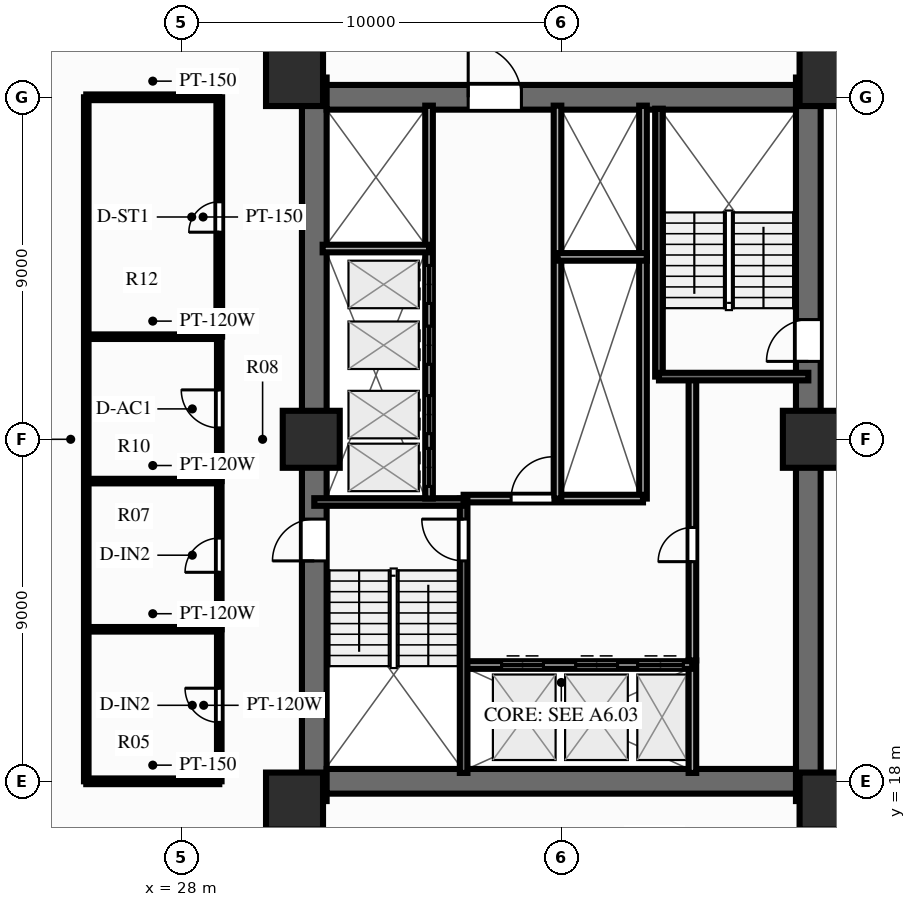
"""IFC4 building model, lengths in metres.
Left out: names, types, materials, properties, quantities, classifications, styles, units other than length and angle.
Written with IfcOpenShell. Run it as: python <this file> out.ifc"""

import sys

from ifc_helpers import new_model, si_unit, direction, frame, frame_2d, origin, origin_2d, place, context, subcontext, project, spatial, rectangle, extrude, source, transform, mapped, element, fill, save


model = new_model("IFC4")
c1 = context("Model", 3, precision=1e-05, world=origin(), true_north=direction((0.0, 1.0)))
c2 = subcontext(c1, "Body", "Model", "MODEL_VIEW")
j1 = project(units=[si_unit("LENGTHUNIT", "METRE"), si_unit("PLANEANGLEUNIT", "RADIAN")], contexts=[c1])
p1 = place(None, origin())
s1 = spatial("IfcSite", under=j1, at=p1, CompositionType="ELEMENT")
p2 = place(p1, origin())
s2 = spatial("IfcBuilding", under=s1, at=p2, CompositionType="ELEMENT")
p3 = place(p2, frame((0.0, 0.0, 11.4)))
s3 = spatial("IfcBuildingStorey", under=s2, at=p3, CompositionType="ELEMENT", Elevation=11.4)
p4 = place(p3, frame((31.5, 17.48, 0.0), z_axis=(0.0, 0.0, 1.0), x_axis=(0.0, 1.0, 0.0)))
e1 = element("IfcWall", 1, at=p4, inside=s3, PredefinedType="SHEAR", context=c2, shape_type="SweptSolid", body=[
    extrude(rectangle(XDim=19.04, YDim=0.65, at=frame_2d((9.52, 0.0))), origin(), (0.0, 0.0, 1.0), 3.6),
])
p5 = place(p4, frame((6.32, 0.0, 0.0)))
e2 = element("IfcOpeningElement", 2, at=p5, cuts=e1, PredefinedType="OPENING", context=c2, shape_type="SweptSolid", body=[
    extrude(rectangle(XDim=1.1, YDim=2.15, at=frame_2d((0.55, 1.075))), frame((0.0, 0.337, 0.0), z_axis=(0.0, -1.0, 0.0), x_axis=(1.0, 0.0, 0.0)), (0.0, 0.0, 1.0), 0.674),
])
p6 = place(p3, frame((44.5, 17.48, 0.0), z_axis=(0.0, 0.0, 1.0), x_axis=(0.0, 1.0, 0.0)))
e3 = element("IfcWall", 3, at=p6, inside=s3, PredefinedType="SHEAR", context=c2, shape_type="SweptSolid", body=[
    extrude(rectangle(XDim=19.04, YDim=0.65, at=frame_2d((9.52, 0.0))), origin(), (0.0, 0.0, 1.0), 3.6),
])
p7 = place(p6, frame((12.67, 0.0, 0.0), z_axis=(0.0, 0.0, 1.0), x_axis=(-1.0, 0.0, 0.0)))
e4 = element("IfcOpeningElement", 4, at=p7, cuts=e3, PredefinedType="OPENING", context=c2, shape_type="SweptSolid", body=[
    extrude(rectangle(XDim=1.1, YDim=2.15, at=frame_2d((0.55, 1.075))), frame((0.0, 0.337, 0.0), z_axis=(0.0, -1.0, 0.0), x_axis=(1.0, 0.0, 0.0)), (0.0, 0.0, 1.0), 0.674),
])
p8 = place(p3, frame((31.825, 18.0, 0.0), z_axis=(0.0, 0.0, 1.0), x_axis=(1.0, 0.0, 0.0)))
e5 = element("IfcWall", 5, at=p8, inside=s3, PredefinedType="SHEAR", context=c2, shape_type="SweptSolid", body=[
    extrude(rectangle(XDim=12.35, YDim=0.65, at=frame_2d((6.175, 0.0))), origin(), (0.0, 0.0, 1.0), 3.6),
])
p9 = place(p3, frame((31.825, 36.0, 0.0), z_axis=(0.0, 0.0, 1.0), x_axis=(1.0, 0.0, 0.0)))
e6 = element("IfcWall", 6, at=p9, inside=s3, PredefinedType="SHEAR", context=c2, shape_type="SweptSolid", body=[
    extrude(rectangle(XDim=12.35, YDim=0.65, at=frame_2d((6.175, 0.0))), origin(), (0.0, 0.0, 1.0), 3.6),
])
p10 = place(p9, frame((5.125, 0.0, 0.0), z_axis=(0.0, 0.0, 1.0), x_axis=(-1.0, 0.0, 0.0)))
e7 = element("IfcOpeningElement", 7, at=p10, cuts=e6, PredefinedType="OPENING", context=c2, shape_type="SweptSolid", body=[
    extrude(rectangle(XDim=1.4, YDim=2.15, at=frame_2d((0.7, 1.075))), frame((0.0, 0.337, 0.0), z_axis=(0.0, -1.0, 0.0), x_axis=(1.0, 0.0, 0.0)), (0.0, 0.0, 1.0), 0.674),
])
m1 = source(origin(), c2, "Body", "SweptSolid", [
    extrude(rectangle(XDim=1.5, YDim=1.5, at=origin_2d()), origin(), (0.0, 0.0, 1.0), 3.6),
])
for number, where, z_axis, x_axis in (
    (8, (30.98, 17.48, 0.0), (0.0, 0.0, 1.0), (1.0, 0.0, 0.0)),
    (9, (45.02, 17.48, 0.0), (0.0, 0.0, 1.0), (1.0, 0.0, 0.0)),
    (10, (30.98, 36.52, 0.0), (0.0, 0.0, 1.0), (1.0, 0.0, 0.0)),
    (11, (45.02, 36.52, 0.0), (0.0, 0.0, 1.0), (1.0, 0.0, 0.0)),
    (12, (31.42, 27.0, 0.0), (0.0, 0.0, 1.0), (1.0, 0.0, 0.0)),
    (13, (44.58, 27.0, 0.0), (0.0, 0.0, 1.0), (1.0, 0.0, 0.0)),
):
    element("IfcColumn", number, at=place(p3, frame(where, z_axis=z_axis, x_axis=x_axis)), inside=s3, PredefinedType="COLUMN", context=c2, shape_type="MappedRepresentation", body=[
        mapped(m1, transform((0.0, 0.0, 0.0), scale=1.0)),
    ])
p11 = place(p3, frame((41.45, 18.22, 0.0), z_axis=(0.0, 0.0, 1.0), x_axis=(0.0, 1.0, 0.0)))
e14 = element("IfcWall", 14, at=p11, inside=s3, PredefinedType="PARTITIONING", context=c2, shape_type="SweptSolid", body=[
    extrude(rectangle(XDim=2.96, YDim=0.2, at=frame_2d((1.48, 0.0))), origin(), (0.0, 0.0, 1.0), 3.25),
])
p12 = place(p3, frame((41.45, 21.18, 0.0), z_axis=(0.0, 0.0, 1.0), x_axis=(0.0, 1.0, 0.0)))
e15 = element("IfcWall", 15, at=p12, inside=s3, PredefinedType="PARTITIONING", context=c2, shape_type="SweptSolid", body=[
    extrude(rectangle(XDim=7.42, YDim=0.2, at=frame_2d((3.71, 0.0))), origin(), (0.0, 0.0, 1.0), 3.25),
])
p13 = place(p12, frame((2.6, 0.0, 0.0)))
e16 = element("IfcOpeningElement", 16, at=p13, cuts=e15, PredefinedType="OPENING", context=c2, shape_type="SweptSolid", body=[
    extrude(rectangle(XDim=0.9, YDim=2.1, at=frame_2d((0.45, 1.05))), frame((0.0, 0.112, 0.0), z_axis=(0.0, -1.0, 0.0), x_axis=(1.0, 0.0, 0.0)), (0.0, 0.0, 1.0), 0.224),
])
p14 = place(p3, frame((40.15, 25.44, 0.0), z_axis=(0.0, 0.0, 1.0), x_axis=(0.0, 1.0, 0.0)))
e17 = element("IfcWall", 17, at=p14, inside=s3, PredefinedType="PARTITIONING", context=c2, shape_type="SweptSolid", body=[
    extrude(rectangle(XDim=6.36, YDim=0.2, at=frame_2d((3.18, 0.0))), origin(), (0.0, 0.0, 1.0), 3.25),
])
p15 = place(p3, frame((40.15, 31.8, 0.0), z_axis=(0.0, 0.0, 1.0), x_axis=(0.0, 1.0, 0.0)))
e18 = element("IfcWall", 18, at=p15, inside=s3, PredefinedType="PARTITIONING", context=c2, shape_type="SweptSolid", body=[
    extrude(rectangle(XDim=3.98, YDim=0.2, at=frame_2d((1.99, 0.0))), origin(), (0.0, 0.0, 1.0), 3.25),
])
p16 = place(p3, frame((35.43, 21.06, 0.0), z_axis=(0.0, 0.0, 1.0), x_axis=(1.0, 0.0, 0.0)))
e19 = element("IfcWall", 19, at=p16, inside=s3, PredefinedType="PARTITIONING", context=c2, shape_type="SweptSolid", body=[
    extrude(rectangle(XDim=6.02, YDim=0.2, at=frame_2d((3.01, 0.0))), origin(), (0.0, 0.0, 1.0), 3.25),
])
p17 = place(p16, frame((1.0, 0.0, 0.0)))
e20 = element("IfcOpeningElement", 20, at=p17, cuts=e19, PredefinedType="OPENING", context=c2, shape_type="SweptSolid", body=[
    extrude(rectangle(XDim=1.1, YDim=2.15, at=frame_2d((0.55, 1.075))), frame((0.0, 0.112, 0.0), z_axis=(0.0, -1.0, 0.0), x_axis=(1.0, 0.0, 0.0)), (0.0, 0.0, 1.0), 0.224),
])
p18 = place(p16, frame((2.95, 0.0, 0.0)))
e21 = element("IfcOpeningElement", 21, at=p18, cuts=e19, PredefinedType="OPENING", context=c2, shape_type="SweptSolid", body=[
    extrude(rectangle(XDim=1.1, YDim=2.15, at=frame_2d((0.55, 1.075))), frame((0.0, 0.112, 0.0), z_axis=(0.0, -1.0, 0.0), x_axis=(1.0, 0.0, 0.0)), (0.0, 0.0, 1.0), 0.224),
])
p19 = place(p16, frame((4.58, 0.0, 0.0)))
e22 = element("IfcOpeningElement", 22, at=p19, cuts=e19, PredefinedType="OPENING", context=c2, shape_type="SweptSolid", body=[
    extrude(rectangle(XDim=1.2, YDim=2.15, at=frame_2d((0.6, 1.075))), frame((0.0, 0.112, 0.0), z_axis=(0.0, -1.0, 0.0), x_axis=(1.0, 0.0, 0.0)), (0.0, 0.0, 1.0), 0.224),
])
p20 = place(p3, frame((35.43, 25.44, 0.0), z_axis=(0.0, 0.0, 1.0), x_axis=(1.0, 0.0, 0.0)))
e23 = element("IfcWall", 23, at=p20, inside=s3, PredefinedType="PARTITIONING", context=c2, shape_type="SweptSolid", body=[
    extrude(rectangle(XDim=4.72, YDim=0.2, at=frame_2d((2.36, 0.0))), origin(), (0.0, 0.0, 1.0), 3.25),
])
p21 = place(p20, frame((1.25, 0.0, 0.0)))
e24 = element("IfcOpeningElement", 24, at=p21, cuts=e23, PredefinedType="OPENING", context=c2, shape_type="SweptSolid", body=[
    extrude(rectangle(XDim=1.1, YDim=2.15, at=frame_2d((0.55, 1.075))), frame((0.0, 0.112, 0.0), z_axis=(0.0, -1.0, 0.0), x_axis=(1.0, 0.0, 0.0)), (0.0, 0.0, 1.0), 0.224),
])
p22 = place(p3, frame((35.43, 18.22, 0.0), z_axis=(0.0, 0.0, 1.0), x_axis=(0.0, 1.0, 0.0)))
e25 = element("IfcWall", 25, at=p22, inside=s3, PredefinedType="SOLIDWALL", context=c2, shape_type="SweptSolid", body=[
    extrude(rectangle(XDim=7.22, YDim=0.2, at=frame_2d((3.61, 0.0))), origin(), (0.0, 0.0, 1.0), 3.25),
])
p23 = place(p22, frame((6.68, 0.0, 0.0), z_axis=(0.0, 0.0, 1.0), x_axis=(-1.0, 0.0, 0.0)))
e26 = element("IfcOpeningElement", 26, at=p23, cuts=e25, PredefinedType="OPENING", context=c2, shape_type="SweptSolid", body=[
    extrude(rectangle(XDim=1.1, YDim=2.15, at=frame_2d((0.55, 1.075))), frame((0.0, 0.112, 0.0), z_axis=(0.0, -1.0, 0.0), x_axis=(1.0, 0.0, 0.0)), (0.0, 0.0, 1.0), 0.224),
])
p24 = place(p3, frame((31.5, 25.35, 0.0), z_axis=(0.0, 0.0, 1.0), x_axis=(1.0, 0.0, 0.0)))
e27 = element("IfcWall", 27, at=p24, inside=s3, PredefinedType="SOLIDWALL", context=c2, shape_type="SweptSolid", body=[
    extrude(rectangle(XDim=3.93, YDim=0.2, at=frame_2d((1.965, 0.0))), origin(), (0.0, 0.0, 1.0), 3.25),
])
p25 = place(p3, frame((40.57, 28.65, 0.0), z_axis=(0.0, 0.0, 1.0), x_axis=(0.0, 1.0, 0.0)))
e28 = element("IfcWall", 28, at=p25, inside=s3, PredefinedType="SOLIDWALL", context=c2, shape_type="SweptSolid", body=[
    extrude(rectangle(XDim=7.05, YDim=0.2, at=frame_2d((3.525, 0.0))), origin(), (0.0, 0.0, 1.0), 3.25),
])
p26 = place(p3, frame((40.57, 28.65, 0.0), z_axis=(0.0, 0.0, 1.0), x_axis=(1.0, 0.0, 0.0)))
e29 = element("IfcWall", 29, at=p26, inside=s3, PredefinedType="SOLIDWALL", context=c2, shape_type="SweptSolid", body=[
    extrude(rectangle(XDim=3.93, YDim=0.2, at=frame_2d((1.965, 0.0))), origin(), (0.0, 0.0, 1.0), 3.25),
])
p27 = place(p3, frame((34.52, 25.44, 0.0), z_axis=(0.0, 0.0, 1.0), x_axis=(0.0, 1.0, 0.0)))
e30 = element("IfcWall", 30, at=p27, inside=s3, PredefinedType="PARTITIONING", context=c2, shape_type="SweptSolid", body=[
    extrude(rectangle(XDim=10.34, YDim=0.2, at=frame_2d((5.17, 0.0))), origin(), (0.0, 0.0, 1.0), 3.25),
])
p28 = place(p27, frame((0.32, 0.0, 0.0)))
e31 = element("IfcOpeningElement", 31, at=p28, cuts=e30, PredefinedType="OPENING", context=c2, shape_type="SweptSolid", body=[
    extrude(rectangle(XDim=1.0, YDim=2.15, at=frame_2d((0.5, 1.075))), frame((0.0, 0.112, 0.0), z_axis=(0.0, -1.0, 0.0), x_axis=(1.0, 0.0, 0.0)), (0.0, 0.0, 1.0), 0.224),
])
p29 = place(p27, frame((1.71, 0.0, 0.0)))
e32 = element("IfcOpeningElement", 32, at=p29, cuts=e30, PredefinedType="OPENING", context=c2, shape_type="SweptSolid", body=[
    extrude(rectangle(XDim=1.0, YDim=2.15, at=frame_2d((0.5, 1.075))), frame((0.0, 0.112, 0.0), z_axis=(0.0, -1.0, 0.0), x_axis=(1.0, 0.0, 0.0)), (0.0, 0.0, 1.0), 0.224),
])
p30 = place(p27, frame((3.535, 0.0, 0.0)))
e33 = element("IfcOpeningElement", 33, at=p30, cuts=e30, PredefinedType="OPENING", context=c2, shape_type="SweptSolid", body=[
    extrude(rectangle(XDim=1.0, YDim=2.15, at=frame_2d((0.5, 1.075))), frame((0.0, 0.112, 0.0), z_axis=(0.0, -1.0, 0.0), x_axis=(1.0, 0.0, 0.0)), (0.0, 0.0, 1.0), 0.224),
])
p31 = place(p27, frame((5.135, 0.0, 0.0)))
e34 = element("IfcOpeningElement", 34, at=p31, cuts=e30, PredefinedType="OPENING", context=c2, shape_type="SweptSolid", body=[
    extrude(rectangle(XDim=1.0, YDim=2.15, at=frame_2d((0.5, 1.075))), frame((0.0, 0.112, 0.0), z_axis=(0.0, -1.0, 0.0), x_axis=(1.0, 0.0, 0.0)), (0.0, 0.0, 1.0), 0.224),
])
p32 = place(p3, frame((31.72, 32.02, 0.0), z_axis=(0.0, 0.0, 1.0), x_axis=(1.0, 0.0, 0.0)))
e35 = element("IfcWall", 35, at=p32, inside=s3, PredefinedType="PARTITIONING", context=c2, shape_type="SweptSolid", body=[
    extrude(rectangle(XDim=2.8, YDim=0.2, at=frame_2d((1.4, 0.0))), origin(), (0.0, 0.0, 1.0), 3.25),
])
p33 = place(p3, frame((37.9, 25.44, 0.0), z_axis=(0.0, 0.0, 1.0), x_axis=(0.0, 1.0, 0.0)))
e36 = element("IfcWall", 36, at=p33, inside=s3, PredefinedType="PARTITIONING", context=c2, shape_type="SweptSolid", body=[
    extrude(rectangle(XDim=10.34, YDim=0.2, at=frame_2d((5.17, 0.0))), origin(), (0.0, 0.0, 1.0), 3.25),
])
p34 = place(p3, frame((37.9, 31.8, 0.0), z_axis=(0.0, 0.0, 1.0), x_axis=(1.0, 0.0, 0.0)))
e37 = element("IfcWall", 37, at=p34, inside=s3, PredefinedType="PARTITIONING", context=c2, shape_type="SweptSolid", body=[
    extrude(rectangle(XDim=2.35, YDim=0.2, at=frame_2d((1.175, 0.0))), origin(), (0.0, 0.0, 1.0), 3.25),
])
p35 = place(p3, frame((25.5, 18.0, 0.0), z_axis=(0.0, 0.0, 1.0), x_axis=(0.0, 1.0, 0.0)))
e38 = element("IfcWall", 38, at=p35, inside=s3, PredefinedType="PARTITIONING", context=c2, shape_type="SweptSolid", body=[
    extrude(rectangle(XDim=18.0, YDim=0.12, at=frame_2d((9.0, 0.0))), origin(), (0.0, 0.0, 1.0), 3.25),
])
p36 = place(p3, frame((29.0, 18.0, 0.0), z_axis=(0.0, 0.0, 1.0), x_axis=(0.0, 1.0, 0.0)))
e39 = element("IfcWall", 39, at=p36, inside=s3, PredefinedType="PARTITIONING", context=c2, shape_type="SweptSolid", body=[
    extrude(rectangle(XDim=4.0, YDim=0.12, at=frame_2d((2.0, 0.0))), origin(), (0.0, 0.0, 1.0), 3.25),
])
p37 = place(p36, frame((1.55, 0.0, 0.0)))
e40 = element("IfcOpeningElement", 40, at=p37, cuts=e39, PredefinedType="OPENING", context=c2, shape_type="SweptSolid", body=[
    extrude(rectangle(XDim=0.9, YDim=2.1, at=frame_2d((0.45, 1.05))), frame((0.0, 0.072, 0.0), z_axis=(0.0, -1.0, 0.0), x_axis=(1.0, 0.0, 0.0)), (0.0, 0.0, 1.0), 0.144),
])
p38 = place(p3, frame((29.0, 22.0, 0.0), z_axis=(0.0, 0.0, 1.0), x_axis=(0.0, 1.0, 0.0)))
e41 = element("IfcWall", 41, at=p38, inside=s3, PredefinedType="PARTITIONING", context=c2, shape_type="SweptSolid", body=[
    extrude(rectangle(XDim=3.9, YDim=0.12, at=frame_2d((1.95, 0.0))), origin(), (0.0, 0.0, 1.0), 3.25),
])
p39 = place(p38, frame((1.5, 0.0, 0.0)))
e42 = element("IfcOpeningElement", 42, at=p39, cuts=e41, PredefinedType="OPENING", context=c2, shape_type="SweptSolid", body=[
    extrude(rectangle(XDim=0.9, YDim=2.1, at=frame_2d((0.45, 1.05))), frame((0.0, 0.072, 0.0), z_axis=(0.0, -1.0, 0.0), x_axis=(1.0, 0.0, 0.0)), (0.0, 0.0, 1.0), 0.144),
])
p40 = place(p3, frame((29.0, 25.9, 0.0), z_axis=(0.0, 0.0, 1.0), x_axis=(0.0, 1.0, 0.0)))
e43 = element("IfcWall", 43, at=p40, inside=s3, PredefinedType="PARTITIONING", context=c2, shape_type="SweptSolid", body=[
    extrude(rectangle(XDim=3.8, YDim=0.12, at=frame_2d((1.9, 0.0))), origin(), (0.0, 0.0, 1.0), 3.25),
])
p41 = place(p40, frame((1.4, 0.0, 0.0)))
e44 = element("IfcOpeningElement", 44, at=p41, cuts=e43, PredefinedType="OPENING", context=c2, shape_type="SweptSolid", body=[
    extrude(rectangle(XDim=1.0, YDim=2.1, at=frame_2d((0.5, 1.05))), frame((0.0, 0.072, 0.0), z_axis=(0.0, -1.0, 0.0), x_axis=(1.0, 0.0, 0.0)), (0.0, 0.0, 1.0), 0.144),
])
p42 = place(p3, frame((29.0, 29.7, 0.0), z_axis=(0.0, 0.0, 1.0), x_axis=(0.0, 1.0, 0.0)))
e45 = element("IfcWall", 45, at=p42, inside=s3, PredefinedType="PARTITIONING", context=c2, shape_type="SweptSolid", body=[
    extrude(rectangle(XDim=6.3, YDim=0.15, at=frame_2d((3.15, 0.0))), origin(), (0.0, 0.0, 1.0), 3.25),
])
p43 = place(p42, frame((2.75, 0.0, 0.0)))
e46 = element("IfcOpeningElement", 46, at=p43, cuts=e45, PredefinedType="OPENING", context=c2, shape_type="SweptSolid", body=[
    extrude(rectangle(XDim=0.8, YDim=2.05, at=frame_2d((0.4, 1.025))), frame((0.0, 0.087, 0.0), z_axis=(0.0, -1.0, 0.0), x_axis=(1.0, 0.0, 0.0)), (0.0, 0.0, 1.0), 0.174),
])
for number, where, z_axis, x_axis in (
    (47, (25.5, 22.0, 0.0), (0.0, 0.0, 1.0), (1.0, 0.0, 0.0)),
    (48, (25.5, 25.9, 0.0), (0.0, 0.0, 1.0), (1.0, 0.0, 0.0)),
    (49, (25.5, 29.7, 0.0), (0.0, 0.0, 1.0), (1.0, 0.0, 0.0)),
):
    element("IfcWall", number, at=place(p3, frame(where, z_axis=z_axis, x_axis=x_axis)), inside=s3, PredefinedType="PARTITIONING", context=c2, shape_type="SweptSolid", body=[
        extrude(rectangle(XDim=3.5, YDim=0.12, at=frame_2d((1.75, 0.0))), origin(), (0.0, 0.0, 1.0), 3.25),
    ])
for number, where, z_axis, x_axis in (
    (50, (25.5, 36.0, 0.0), (0.0, 0.0, 1.0), (1.0, 0.0, 0.0)),
    (51, (25.5, 18.0, 0.0), (0.0, 0.0, 1.0), (1.0, 0.0, 0.0)),
):
    element("IfcWall", number, at=place(p3, frame(where, z_axis=z_axis, x_axis=x_axis)), inside=s3, PredefinedType="PARTITIONING", context=c2, shape_type="SweptSolid", body=[
        extrude(rectangle(XDim=3.5, YDim=0.15, at=frame_2d((1.75, 0.0))), origin(), (0.0, 0.0, 1.0), 2.69),
    ])
m2 = source(origin(), c2, "Body", "SweptSolid", [
    extrude(rectangle(XDim=1.1, YDim=2.15, at=frame_2d((0.55, 1.075))), frame((0.0, 0.025, 0.0), z_axis=(0.0, -1.0, 0.0), x_axis=(1.0, 0.0, 0.0)), (0.0, 0.0, 1.0), 0.05),
])
p44 = place(p5, origin())
e52 = element("IfcDoor", 52, at=p44, inside=s3, OperationType="SINGLE_SWING_LEFT", PredefinedType="DOOR", context=c2, shape_type="MappedRepresentation", body=[
    mapped(m2, transform((0.0, 0.0, 0.0), scale=1.0)),
])
fill(e2, e52)
p45 = place(p7, origin())
e53 = element("IfcDoor", 53, at=p45, inside=s3, OperationType="SINGLE_SWING_RIGHT", PredefinedType="DOOR", context=c2, shape_type="MappedRepresentation", body=[
    mapped(m2, transform((0.0, 0.0, 0.0), scale=1.0)),
])
fill(e4, e53)
m3 = source(origin(), c2, "Body", "SweptSolid", [
    extrude(rectangle(XDim=1.4, YDim=2.15, at=frame_2d((0.7, 1.075))), frame((0.0, 0.025, 0.0), z_axis=(0.0, -1.0, 0.0), x_axis=(1.0, 0.0, 0.0)), (0.0, 0.0, 1.0), 0.05),
])
p46 = place(p10, origin())
e54 = element("IfcDoor", 54, at=p46, inside=s3, OperationType="SINGLE_SWING_RIGHT", PredefinedType="DOOR", context=c2, shape_type="MappedRepresentation", body=[
    mapped(m3, transform((0.0, 0.0, 0.0), scale=1.0)),
])
fill(e7, e54)
m4 = source(origin(), c2, "Body", "SweptSolid", [
    extrude(rectangle(XDim=0.9, YDim=2.1, at=frame_2d((0.45, 1.05))), frame((0.0, 0.025, 0.0), z_axis=(0.0, -1.0, 0.0), x_axis=(1.0, 0.0, 0.0)), (0.0, 0.0, 1.0), 0.05),
])
p47 = place(p13, origin())
e55 = element("IfcDoor", 55, at=p47, inside=s3, OperationType="SINGLE_SWING_LEFT", PredefinedType="DOOR", context=c2, shape_type="MappedRepresentation", body=[
    mapped(m4, transform((0.0, 0.0, 0.0), scale=1.0)),
])
fill(e16, e55)
p48 = place(p17, origin())
e56 = element("IfcDoor", 56, at=p48, inside=s3, OperationType="DOUBLE_DOOR_SLIDING", PredefinedType="DOOR", context=c2, shape_type="MappedRepresentation", body=[
    mapped(m2, transform((0.0, 0.0, 0.0), scale=1.0)),
])
fill(e20, e56)
p49 = place(p18, origin())
e57 = element("IfcDoor", 57, at=p49, inside=s3, OperationType="DOUBLE_DOOR_SLIDING", PredefinedType="DOOR", context=c2, shape_type="MappedRepresentation", body=[
    mapped(m2, transform((0.0, 0.0, 0.0), scale=1.0)),
])
fill(e21, e57)
m5 = source(origin(), c2, "Body", "SweptSolid", [
    extrude(rectangle(XDim=1.2, YDim=2.15, at=frame_2d((0.6, 1.075))), frame((0.0, 0.025, 0.0), z_axis=(0.0, -1.0, 0.0), x_axis=(1.0, 0.0, 0.0)), (0.0, 0.0, 1.0), 0.05),
])
p50 = place(p19, origin())
e58 = element("IfcDoor", 58, at=p50, inside=s3, OperationType="DOUBLE_DOOR_SLIDING", PredefinedType="DOOR", context=c2, shape_type="MappedRepresentation", body=[
    mapped(m5, transform((0.0, 0.0, 0.0), scale=1.0)),
])
fill(e22, e58)
p51 = place(p21, origin())
e59 = element("IfcDoor", 59, at=p51, inside=s3, OperationType="SINGLE_SWING_RIGHT", PredefinedType="DOOR", context=c2, shape_type="MappedRepresentation", body=[
    mapped(m2, transform((0.0, 0.0, 0.0), scale=1.0)),
])
fill(e24, e59)
p52 = place(p23, origin())
e60 = element("IfcDoor", 60, at=p52, inside=s3, OperationType="SINGLE_SWING_LEFT", PredefinedType="DOOR", context=c2, shape_type="MappedRepresentation", body=[
    mapped(m2, transform((0.0, 0.0, 0.0), scale=1.0)),
])
fill(e26, e60)
m6 = source(origin(), c2, "Body", "SweptSolid", [
    extrude(rectangle(XDim=1.0, YDim=2.15, at=frame_2d((0.5, 1.075))), frame((0.0, 0.025, 0.0), z_axis=(0.0, -1.0, 0.0), x_axis=(1.0, 0.0, 0.0)), (0.0, 0.0, 1.0), 0.05),
])
p53 = place(p28, origin())
e61 = element("IfcDoor", 61, at=p53, inside=s3, OperationType="DOUBLE_DOOR_SLIDING", PredefinedType="DOOR", context=c2, shape_type="MappedRepresentation", body=[
    mapped(m6, transform((0.0, 0.0, 0.0), scale=1.0)),
])
fill(e31, e61)
p54 = place(p29, origin())
e62 = element("IfcDoor", 62, at=p54, inside=s3, OperationType="DOUBLE_DOOR_SLIDING", PredefinedType="DOOR", context=c2, shape_type="MappedRepresentation", body=[
    mapped(m6, transform((0.0, 0.0, 0.0), scale=1.0)),
])
fill(e32, e62)
p55 = place(p30, origin())
e63 = element("IfcDoor", 63, at=p55, inside=s3, OperationType="DOUBLE_DOOR_SLIDING", PredefinedType="DOOR", context=c2, shape_type="MappedRepresentation", body=[
    mapped(m6, transform((0.0, 0.0, 0.0), scale=1.0)),
])
fill(e33, e63)
p56 = place(p31, origin())
e64 = element("IfcDoor", 64, at=p56, inside=s3, OperationType="DOUBLE_DOOR_SLIDING", PredefinedType="DOOR", context=c2, shape_type="MappedRepresentation", body=[
    mapped(m6, transform((0.0, 0.0, 0.0), scale=1.0)),
])
fill(e34, e64)
p57 = place(p37, origin())
e65 = element("IfcDoor", 65, at=p57, inside=s3, OperationType="SINGLE_SWING_RIGHT", PredefinedType="DOOR", context=c2, shape_type="MappedRepresentation", body=[
    mapped(m4, transform((0.0, 0.0, 0.0), scale=1.0)),
])
fill(e40, e65)
p58 = place(p39, origin())
e66 = element("IfcDoor", 66, at=p58, inside=s3, OperationType="SINGLE_SWING_LEFT", PredefinedType="DOOR", context=c2, shape_type="MappedRepresentation", body=[
    mapped(m4, transform((0.0, 0.0, 0.0), scale=1.0)),
])
fill(e42, e66)
m7 = source(origin(), c2, "Body", "SweptSolid", [
    extrude(rectangle(XDim=1.0, YDim=2.1, at=frame_2d((0.5, 1.05))), frame((0.0, 0.025, 0.0), z_axis=(0.0, -1.0, 0.0), x_axis=(1.0, 0.0, 0.0)), (0.0, 0.0, 1.0), 0.05),
])
p59 = place(p41, origin())
e67 = element("IfcDoor", 67, at=p59, inside=s3, OperationType="SINGLE_SWING_RIGHT", PredefinedType="DOOR", context=c2, shape_type="MappedRepresentation", body=[
    mapped(m7, transform((0.0, 0.0, 0.0), scale=1.0)),
])
fill(e44, e67)
m8 = source(origin(), c2, "Body", "SweptSolid", [
    extrude(rectangle(XDim=0.8, YDim=2.05, at=frame_2d((0.4, 1.025))), frame((0.0, 0.025, 0.0), z_axis=(0.0, -1.0, 0.0), x_axis=(1.0, 0.0, 0.0)), (0.0, 0.0, 1.0), 0.05),
])
p60 = place(p43, origin())
e68 = element("IfcDoor", 68, at=p60, inside=s3, OperationType="SINGLE_SWING_LEFT", PredefinedType="DOOR", context=c2, shape_type="MappedRepresentation", body=[
    mapped(m8, transform((0.0, 0.0, 0.0), scale=1.0)),
])
fill(e46, e68)
save(model, sys.argv[1])
